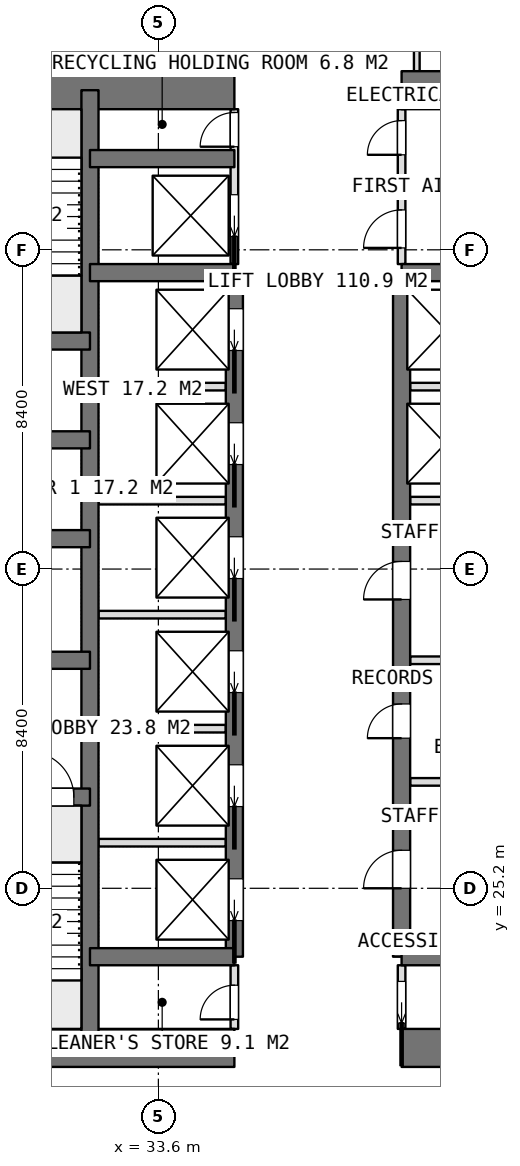
"""IFC4 building model, lengths in metres.
Left out: names, types, materials, properties, quantities, classifications, styles, units other than length and angle.
Written with IfcOpenShell. Run it as: python <this file> out.ifc"""

import sys

from ifc_helpers import new_model, si_unit, direction, frame, frame_2d, origin, place, context, subcontext, project, spatial, rectangle, extrude, element, fill, save


model = new_model("IFC4")
c1 = context("Model", 3, precision=1e-05, world=origin(), true_north=direction((0.0, 1.0)))
c2 = subcontext(c1, "Body", "Model", "MODEL_VIEW")
j1 = project(units=[si_unit("LENGTHUNIT", "METRE"), si_unit("PLANEANGLEUNIT", "RADIAN")], contexts=[c1])
p1 = place(None, origin())
s1 = spatial("IfcSite", under=j1, at=p1, CompositionType="ELEMENT")
p2 = place(p1, origin())
s2 = spatial("IfcBuilding", under=s1, at=p2, CompositionType="ELEMENT")
p3 = place(p2, frame((0.0, 0.0, 213.95)))
s3 = spatial("IfcBuildingStorey", under=s2, at=p3, CompositionType="ELEMENT", Elevation=213.95)
p4 = place(p3, frame((25.2, 21.0, 0.0), z_axis=(0.0, 0.0, 1.0), x_axis=(1.0, 0.0, 0.0)))
e1 = element("IfcWall", 1, at=p4, inside=s3, PredefinedType="SHEAR", context=c2, shape_type="SweptSolid", body=[
    extrude(rectangle(XDim=10.4, YDim=1.0, at=frame_2d((5.2, 0.0))), origin(), (0.0, 0.0, 1.0), 3.75),
])
p5 = place(p3, frame((40.0, 21.0, 0.0), z_axis=(0.0, 0.0, 1.0), x_axis=(1.0, 0.0, 0.0)))
e2 = element("IfcWall", 2, at=p5, inside=s3, PredefinedType="SHEAR", context=c2, shape_type="SweptSolid", body=[
    extrude(rectangle(XDim=10.4, YDim=1.0, at=frame_2d((5.2, 0.0))), origin(), (0.0, 0.0, 1.0), 3.75),
])
p6 = place(p3, frame((25.2, 46.2, 0.0), z_axis=(0.0, 0.0, 1.0), x_axis=(1.0, 0.0, 0.0)))
e3 = element("IfcWall", 3, at=p6, inside=s3, PredefinedType="SHEAR", context=c2, shape_type="SweptSolid", body=[
    extrude(rectangle(XDim=10.4, YDim=1.0, at=frame_2d((5.2, 0.0))), origin(), (0.0, 0.0, 1.0), 3.75),
])
p7 = place(p3, frame((40.0, 46.2, 0.0), z_axis=(0.0, 0.0, 1.0), x_axis=(1.0, 0.0, 0.0)))
e4 = element("IfcWall", 4, at=p7, inside=s3, PredefinedType="SHEAR", context=c2, shape_type="SweptSolid", body=[
    extrude(rectangle(XDim=10.4, YDim=1.0, at=frame_2d((5.2, 0.0))), origin(), (0.0, 0.0, 1.0), 3.75),
])
p8 = place(p3, frame((31.8, 21.0, 0.0), z_axis=(0.0, 0.0, 1.0), x_axis=(0.0, 1.0, 0.0)))
e5 = element("IfcWall", 5, at=p8, inside=s3, PredefinedType="SHEAR", context=c2, shape_type="SweptSolid", body=[
    extrude(rectangle(XDim=25.2, YDim=0.45, at=frame_2d((12.6, 0.0))), origin(), (0.0, 0.0, 1.0), 3.75),
])
p9 = place(p3, frame((35.6, 23.4, 0.0), z_axis=(0.0, 0.0, 1.0), x_axis=(0.0, 1.0, 0.0)))
e6 = element("IfcWall", 6, at=p9, inside=s3, PredefinedType="SHEAR", context=c2, shape_type="SweptSolid", body=[
    extrude(rectangle(XDim=18.0, YDim=0.45, at=frame_2d((9.0, 0.0))), origin(), (0.0, 0.0, 1.0), 3.75),
])
p10 = place(p9, frame((0.95, 0.0, 0.0)))
e7 = element("IfcOpeningElement", 7, at=p10, cuts=e6, PredefinedType="OPENING", context=c2, shape_type="SweptSolid", body=[
    extrude(rectangle(XDim=1.1, YDim=2.1, at=frame_2d((0.55, 1.05))), frame((0.0, 0.235, 0.0), z_axis=(0.0, -1.0, 0.0), x_axis=(1.0, 0.0, 0.0)), (0.0, 0.0, 1.0), 0.47),
])
p11 = place(p9, frame((3.95, 0.0, 0.0)))
e8 = element("IfcOpeningElement", 8, at=p11, cuts=e6, PredefinedType="OPENING", context=c2, shape_type="SweptSolid", body=[
    extrude(rectangle(XDim=1.1, YDim=2.1, at=frame_2d((0.55, 1.05))), frame((0.0, 0.235, 0.0), z_axis=(0.0, -1.0, 0.0), x_axis=(1.0, 0.0, 0.0)), (0.0, 0.0, 1.0), 0.47),
])
p12 = place(p9, frame((6.95, 0.0, 0.0)))
e9 = element("IfcOpeningElement", 9, at=p12, cuts=e6, PredefinedType="OPENING", context=c2, shape_type="SweptSolid", body=[
    extrude(rectangle(XDim=1.1, YDim=2.1, at=frame_2d((0.55, 1.05))), frame((0.0, 0.235, 0.0), z_axis=(0.0, -1.0, 0.0), x_axis=(1.0, 0.0, 0.0)), (0.0, 0.0, 1.0), 0.47),
])
p13 = place(p9, frame((9.95, 0.0, 0.0)))
e10 = element("IfcOpeningElement", 10, at=p13, cuts=e6, PredefinedType="OPENING", context=c2, shape_type="SweptSolid", body=[
    extrude(rectangle(XDim=1.1, YDim=2.1, at=frame_2d((0.55, 1.05))), frame((0.0, 0.235, 0.0), z_axis=(0.0, -1.0, 0.0), x_axis=(1.0, 0.0, 0.0)), (0.0, 0.0, 1.0), 0.47),
])
p14 = place(p9, frame((12.95, 0.0, 0.0)))
e11 = element("IfcOpeningElement", 11, at=p14, cuts=e6, PredefinedType="OPENING", context=c2, shape_type="SweptSolid", body=[
    extrude(rectangle(XDim=1.1, YDim=2.1, at=frame_2d((0.55, 1.05))), frame((0.0, 0.235, 0.0), z_axis=(0.0, -1.0, 0.0), x_axis=(1.0, 0.0, 0.0)), (0.0, 0.0, 1.0), 0.47),
])
p15 = place(p9, frame((15.95, 0.0, 0.0)))
e12 = element("IfcOpeningElement", 12, at=p15, cuts=e6, PredefinedType="OPENING", context=c2, shape_type="SweptSolid", body=[
    extrude(rectangle(XDim=1.1, YDim=2.1, at=frame_2d((0.55, 1.05))), frame((0.0, 0.235, 0.0), z_axis=(0.0, -1.0, 0.0), x_axis=(1.0, 0.0, 0.0)), (0.0, 0.0, 1.0), 0.47),
])
p16 = place(p3, frame((40.0, 23.4, 0.0), z_axis=(0.0, 0.0, 1.0), x_axis=(0.0, 1.0, 0.0)))
e13 = element("IfcWall", 13, at=p16, inside=s3, PredefinedType="SHEAR", context=c2, shape_type="SweptSolid", body=[
    extrude(rectangle(XDim=18.0, YDim=0.45, at=frame_2d((9.0, 0.0))), origin(), (0.0, 0.0, 1.0), 3.75),
])
p17 = place(p16, frame((1.8, 0.0, 0.0)))
e14 = element("IfcOpeningElement", 14, at=p17, cuts=e13, PredefinedType="OPENING", context=c2, shape_type="SweptSolid", body=[
    extrude(rectangle(XDim=1.0, YDim=2.1, at=frame_2d((0.5, 1.05))), frame((0.0, 0.235, 0.0), z_axis=(0.0, -1.0, 0.0), x_axis=(1.0, 0.0, 0.0)), (0.0, 0.0, 1.0), 0.47),
])
p18 = place(p16, frame((5.75, 0.0, 0.0)))
e15 = element("IfcOpeningElement", 15, at=p18, cuts=e13, PredefinedType="OPENING", context=c2, shape_type="SweptSolid", body=[
    extrude(rectangle(XDim=0.9, YDim=2.1, at=frame_2d((0.45, 1.05))), frame((0.0, 0.235, 0.0), z_axis=(0.0, -1.0, 0.0), x_axis=(1.0, 0.0, 0.0)), (0.0, 0.0, 1.0), 0.47),
])
p19 = place(p16, frame((9.4, 0.0, 0.0)))
e16 = element("IfcOpeningElement", 16, at=p19, cuts=e13, PredefinedType="OPENING", context=c2, shape_type="SweptSolid", body=[
    extrude(rectangle(XDim=1.0, YDim=2.1, at=frame_2d((0.5, 1.05))), frame((0.0, 0.235, 0.0), z_axis=(0.0, -1.0, 0.0), x_axis=(1.0, 0.0, 0.0)), (0.0, 0.0, 1.0), 0.47),
])
for number, where, z_axis, x_axis in (
    (17, (31.8, 23.4, 0.0), (0.0, 0.0, 1.0), (1.0, 0.0, 0.0)),
    (18, (31.8, 41.4, 0.0), (0.0, 0.0, 1.0), (1.0, 0.0, 0.0)),
    (19, (31.8, 44.4, 0.0), (0.0, 0.0, 1.0), (1.0, 0.0, 0.0)),
    (20, (40.0, 23.4, 0.0), (0.0, 0.0, 1.0), (1.0, 0.0, 0.0)),
    (21, (40.0, 41.4, 0.0), (0.0, 0.0, 1.0), (1.0, 0.0, 0.0)),
):
    element("IfcWall", number, at=place(p3, frame(where, z_axis=z_axis, x_axis=x_axis)), inside=s3, PredefinedType="SHEAR", context=c2, shape_type="SweptSolid", body=[
        extrude(rectangle(XDim=3.8, YDim=0.45, at=frame_2d((1.9, 0.0))), origin(), (0.0, 0.0, 1.0), 3.75),
    ])
p20 = place(p3, frame((25.2, 27.6, 0.0), z_axis=(0.0, 0.0, 1.0), x_axis=(1.0, 0.0, 0.0)))
e22 = element("IfcWall", 22, at=p20, inside=s3, PredefinedType="SHEAR", context=c2, shape_type="SweptSolid", body=[
    extrude(rectangle(XDim=6.6, YDim=0.45, at=frame_2d((3.3, 0.0))), origin(), (0.0, 0.0, 1.0), 3.75),
])
p21 = place(p20, frame((4.975, 0.0, 0.0)))
e23 = element("IfcOpeningElement", 23, at=p21, cuts=e22, PredefinedType="OPENING", context=c2, shape_type="SweptSolid", body=[
    extrude(rectangle(XDim=1.2, YDim=2.1, at=frame_2d((0.6, 1.05))), frame((0.0, 0.235, 0.0), z_axis=(0.0, -1.0, 0.0), x_axis=(1.0, 0.0, 0.0)), (0.0, 0.0, 1.0), 0.47),
])
p22 = place(p3, frame((25.2, 31.2, 0.0), z_axis=(0.0, 0.0, 1.0), x_axis=(1.0, 0.0, 0.0)))
e24 = element("IfcWall", 24, at=p22, inside=s3, PredefinedType="SHEAR", context=c2, shape_type="SweptSolid", body=[
    extrude(rectangle(XDim=6.6, YDim=0.45, at=frame_2d((3.3, 0.0))), origin(), (0.0, 0.0, 1.0), 3.75),
])
p23 = place(p22, frame((2.65, 0.0, 0.0)))
e25 = element("IfcOpeningElement", 25, at=p23, cuts=e24, PredefinedType="OPENING", context=c2, shape_type="SweptSolid", body=[
    extrude(rectangle(XDim=1.3, YDim=2.1, at=frame_2d((0.65, 1.05))), frame((0.0, 0.235, 0.0), z_axis=(0.0, -1.0, 0.0), x_axis=(1.0, 0.0, 0.0)), (0.0, 0.0, 1.0), 0.47),
])
for number, where, z_axis, x_axis in (
    (26, (25.2, 34.4, 0.0), (0.0, 0.0, 1.0), (1.0, 0.0, 0.0)),
    (27, (25.2, 37.0, 0.0), (0.0, 0.0, 1.0), (1.0, 0.0, 0.0)),
    (28, (25.2, 39.6, 0.0), (0.0, 0.0, 1.0), (1.0, 0.0, 0.0)),
):
    element("IfcWall", number, at=place(p3, frame(where, z_axis=z_axis, x_axis=x_axis)), inside=s3, PredefinedType="SHEAR", context=c2, shape_type="SweptSolid", body=[
        extrude(rectangle(XDim=6.6, YDim=0.45, at=frame_2d((3.3, 0.0))), origin(), (0.0, 0.0, 1.0), 3.75),
    ])
for number, where, z_axis, x_axis in (
    (29, (32.025, 26.4, 0.0), (0.0, 0.0, 1.0), (1.0, 0.0, 0.0)),
    (30, (32.025, 29.4, 0.0), (0.0, 0.0, 1.0), (1.0, 0.0, 0.0)),
    (31, (32.025, 32.4, 0.0), (0.0, 0.0, 1.0), (1.0, 0.0, 0.0)),
    (32, (32.025, 35.4, 0.0), (0.0, 0.0, 1.0), (1.0, 0.0, 0.0)),
    (33, (32.025, 38.4, 0.0), (0.0, 0.0, 1.0), (1.0, 0.0, 0.0)),
):
    element("IfcWall", number, at=place(p3, frame(where, z_axis=z_axis, x_axis=x_axis)), inside=s3, PredefinedType="PARTITIONING", context=c2, shape_type="SweptSolid", body=[
        extrude(rectangle(XDim=3.35, YDim=0.2, at=frame_2d((1.675, 0.0))), origin(), (0.0, 0.0, 1.0), 3.5),
    ])
for number, where, z_axis, x_axis in (
    (34, (40.225, 35.4, 0.0), (0.0, 0.0, 1.0), (1.0, 0.0, 0.0)),
    (35, (40.225, 38.4, 0.0), (0.0, 0.0, 1.0), (1.0, 0.0, 0.0)),
):
    element("IfcWall", number, at=place(p3, frame(where, z_axis=z_axis, x_axis=x_axis)), inside=s3, PredefinedType="PARTITIONING", context=c2, shape_type="SweptSolid", body=[
        extrude(rectangle(XDim=3.35, YDim=0.2, at=frame_2d((1.675, 0.0))), origin(), (0.0, 0.0, 1.0), 3.5),
    ])
p24 = place(p3, frame((40.0, 21.5, 0.0), z_axis=(0.0, 0.0, 1.0), x_axis=(0.0, 1.0, 0.0)))
e36 = element("IfcWall", 36, at=p24, inside=s3, PredefinedType="PARTITIONING", context=c2, shape_type="SweptSolid", body=[
    extrude(rectangle(XDim=1.675, YDim=0.2, at=frame_2d((0.837, 0.0))), origin(), (0.0, 0.0, 1.0), 3.5),
])
p25 = place(p24, frame((0.15, 0.0, 0.0)))
e37 = element("IfcOpeningElement", 37, at=p25, cuts=e36, PredefinedType="OPENING", context=c2, shape_type="SweptSolid", body=[
    extrude(rectangle(XDim=1.1, YDim=2.1, at=frame_2d((0.55, 1.05))), frame((0.0, 0.11, 0.0), z_axis=(0.0, -1.0, 0.0), x_axis=(1.0, 0.0, 0.0)), (0.0, 0.0, 1.0), 0.22),
])
p26 = place(p3, frame((40.0, 41.625, 0.0), z_axis=(0.0, 0.0, 1.0), x_axis=(0.0, 1.0, 0.0)))
e38 = element("IfcWall", 38, at=p26, inside=s3, PredefinedType="PARTITIONING", context=c2, shape_type="SweptSolid", body=[
    extrude(rectangle(XDim=4.075, YDim=0.2, at=frame_2d((2.038, 0.0))), origin(), (0.0, 0.0, 1.0), 3.5),
])
p27 = place(p26, frame((2.875, 0.0, 0.0)))
e39 = element("IfcOpeningElement", 39, at=p27, cuts=e38, PredefinedType="OPENING", context=c2, shape_type="SweptSolid", body=[
    extrude(rectangle(XDim=0.9, YDim=2.1, at=frame_2d((0.45, 1.05))), frame((0.0, 0.11, 0.0), z_axis=(0.0, -1.0, 0.0), x_axis=(1.0, 0.0, 0.0)), (0.0, 0.0, 1.0), 0.22),
])
p28 = place(p26, frame((0.425, 0.0, 0.0)))
e40 = element("IfcOpeningElement", 40, at=p28, cuts=e38, PredefinedType="OPENING", context=c2, shape_type="SweptSolid", body=[
    extrude(rectangle(XDim=1.0, YDim=2.1, at=frame_2d((0.5, 1.05))), frame((0.0, 0.11, 0.0), z_axis=(0.0, -1.0, 0.0), x_axis=(1.0, 0.0, 0.0)), (0.0, 0.0, 1.0), 0.22),
])
p29 = place(p3, frame((35.6, 41.625, 0.0), z_axis=(0.0, 0.0, 1.0), x_axis=(0.0, 1.0, 0.0)))
e41 = element("IfcWall", 41, at=p29, inside=s3, PredefinedType="PARTITIONING", context=c2, shape_type="SweptSolid", body=[
    extrude(rectangle(XDim=4.075, YDim=0.2, at=frame_2d((2.038, 0.0))), origin(), (0.0, 0.0, 1.0), 3.5),
])
p30 = place(p29, frame((3.088, 0.0, 0.0)))
e42 = element("IfcOpeningElement", 42, at=p30, cuts=e41, PredefinedType="OPENING", context=c2, shape_type="SweptSolid", body=[
    extrude(rectangle(XDim=0.9, YDim=2.1, at=frame_2d((0.45, 1.05))), frame((0.0, 0.11, 0.0), z_axis=(0.0, -1.0, 0.0), x_axis=(1.0, 0.0, 0.0)), (0.0, 0.0, 1.0), 0.22),
])
p31 = place(p29, frame((0.725, 0.0, 0.0)))
e43 = element("IfcOpeningElement", 43, at=p31, cuts=e41, PredefinedType="OPENING", context=c2, shape_type="SweptSolid", body=[
    extrude(rectangle(XDim=1.1, YDim=2.1, at=frame_2d((0.55, 1.05))), frame((0.0, 0.11, 0.0), z_axis=(0.0, -1.0, 0.0), x_axis=(1.0, 0.0, 0.0)), (0.0, 0.0, 1.0), 0.22),
])
p32 = place(p3, frame((35.6, 21.5, 0.0), z_axis=(0.0, 0.0, 1.0), x_axis=(0.0, 1.0, 0.0)))
e44 = element("IfcWall", 44, at=p32, inside=s3, PredefinedType="PARTITIONING", context=c2, shape_type="SweptSolid", body=[
    extrude(rectangle(XDim=1.675, YDim=0.2, at=frame_2d((0.837, 0.0))), origin(), (0.0, 0.0, 1.0), 3.5),
])
p33 = place(p32, frame((0.25, 0.0, 0.0)))
e45 = element("IfcOpeningElement", 45, at=p33, cuts=e44, PredefinedType="OPENING", context=c2, shape_type="SweptSolid", body=[
    extrude(rectangle(XDim=0.9, YDim=2.1, at=frame_2d((0.45, 1.05))), frame((0.0, 0.11, 0.0), z_axis=(0.0, -1.0, 0.0), x_axis=(1.0, 0.0, 0.0)), (0.0, 0.0, 1.0), 0.22),
])
for number, where, z_axis, x_axis in (
    (46, (40.225, 28.0, 0.0), (0.0, 0.0, 1.0), (1.0, 0.0, 0.0)),
    (47, (40.225, 31.2, 0.0), (0.0, 0.0, 1.0), (1.0, 0.0, 0.0)),
):
    element("IfcWall", number, at=place(p3, frame(where, z_axis=z_axis, x_axis=x_axis)), inside=s3, PredefinedType="PARTITIONING", context=c2, shape_type="SweptSolid", body=[
        extrude(rectangle(XDim=3.35, YDim=0.2, at=frame_2d((1.675, 0.0))), origin(), (0.0, 0.0, 1.0), 3.5),
    ])
p34 = place(p3, frame((40.0, 43.7, 0.0), z_axis=(0.0, 0.0, 1.0), x_axis=(1.0, 0.0, 0.0)))
e48 = element("IfcWall", 48, at=p34, inside=s3, PredefinedType="PARTITIONING", context=c2, shape_type="SweptSolid", body=[
    extrude(rectangle(XDim=3.575, YDim=0.2, at=frame_2d((1.788, 0.0))), origin(), (0.0, 0.0, 1.0), 3.5),
])
for number, where, z_axis, x_axis in (
    (49, (40.4, 46.7, 0.0), (0.0, 0.0, 1.0), (0.0, 1.0, 0.0)),
    (50, (35.2, 46.7, 0.0), (0.0, 0.0, 1.0), (0.0, 1.0, 0.0)),
):
    element("IfcWall", number, at=place(p3, frame(where, z_axis=z_axis, x_axis=x_axis)), inside=s3, PredefinedType="PARTITIONING", context=c2, shape_type="SweptSolid", body=[
        extrude(rectangle(XDim=2.625, YDim=0.15, at=frame_2d((1.312, 0.0))), origin(), (0.0, 0.0, 1.0), 3.5),
    ])
p35 = place(p25, origin())
e51 = element("IfcDoor", 51, at=p35, inside=s3, OperationType="SLIDING_TO_LEFT", PredefinedType="DOOR", context=c2, shape_type="SweptSolid", body=[
    extrude(rectangle(XDim=1.1, YDim=2.1, at=frame_2d((0.55, 1.05))), frame((0.0, 0.025, 0.0), z_axis=(0.0, -1.0, 0.0), x_axis=(1.0, 0.0, 0.0)), (0.0, 0.0, 1.0), 0.05),
])
fill(e37, e51)
p36 = place(p33, origin())
e52 = element("IfcDoor", 52, at=p36, inside=s3, OperationType="SINGLE_SWING_LEFT", PredefinedType="DOOR", context=c2, shape_type="SweptSolid", body=[
    extrude(rectangle(XDim=0.9, YDim=2.1, at=frame_2d((0.45, 1.05))), frame((0.0, 0.025, 0.0), z_axis=(0.0, -1.0, 0.0), x_axis=(1.0, 0.0, 0.0)), (0.0, 0.0, 1.0), 0.05),
])
fill(e45, e52)
p37 = place(p27, origin())
e53 = element("IfcDoor", 53, at=p37, inside=s3, OperationType="SINGLE_SWING_LEFT", PredefinedType="DOOR", context=c2, shape_type="SweptSolid", body=[
    extrude(rectangle(XDim=0.9, YDim=2.1, at=frame_2d((0.45, 1.05))), frame((0.0, 0.025, 0.0), z_axis=(0.0, -1.0, 0.0), x_axis=(1.0, 0.0, 0.0)), (0.0, 0.0, 1.0), 0.05),
])
fill(e39, e53)
p38 = place(p28, origin())
e54 = element("IfcDoor", 54, at=p38, inside=s3, OperationType="SINGLE_SWING_LEFT", PredefinedType="DOOR", context=c2, shape_type="SweptSolid", body=[
    extrude(rectangle(XDim=1.0, YDim=2.1, at=frame_2d((0.5, 1.05))), frame((0.0, 0.025, 0.0), z_axis=(0.0, -1.0, 0.0), x_axis=(1.0, 0.0, 0.0)), (0.0, 0.0, 1.0), 0.05),
])
fill(e40, e54)
p39 = place(p17, origin())
e55 = element("IfcDoor", 55, at=p39, inside=s3, OperationType="SINGLE_SWING_LEFT", PredefinedType="DOOR", context=c2, shape_type="SweptSolid", body=[
    extrude(rectangle(XDim=1.0, YDim=2.1, at=frame_2d((0.5, 1.05))), frame((0.0, 0.025, 0.0), z_axis=(0.0, -1.0, 0.0), x_axis=(1.0, 0.0, 0.0)), (0.0, 0.0, 1.0), 0.05),
])
fill(e14, e55)
p40 = place(p18, origin())
e56 = element("IfcDoor", 56, at=p40, inside=s3, OperationType="SINGLE_SWING_LEFT", PredefinedType="DOOR", context=c2, shape_type="SweptSolid", body=[
    extrude(rectangle(XDim=0.9, YDim=2.1, at=frame_2d((0.45, 1.05))), frame((0.0, 0.025, 0.0), z_axis=(0.0, -1.0, 0.0), x_axis=(1.0, 0.0, 0.0)), (0.0, 0.0, 1.0), 0.05),
])
fill(e15, e56)
p41 = place(p19, origin())
e57 = element("IfcDoor", 57, at=p41, inside=s3, OperationType="SINGLE_SWING_LEFT", PredefinedType="DOOR", context=c2, shape_type="SweptSolid", body=[
    extrude(rectangle(XDim=1.0, YDim=2.1, at=frame_2d((0.5, 1.05))), frame((0.0, 0.025, 0.0), z_axis=(0.0, -1.0, 0.0), x_axis=(1.0, 0.0, 0.0)), (0.0, 0.0, 1.0), 0.05),
])
fill(e16, e57)
p42 = place(p30, origin())
e58 = element("IfcDoor", 58, at=p42, inside=s3, OperationType="SINGLE_SWING_LEFT", PredefinedType="DOOR", context=c2, shape_type="SweptSolid", body=[
    extrude(rectangle(XDim=0.9, YDim=2.1, at=frame_2d((0.45, 1.05))), frame((0.0, 0.025, 0.0), z_axis=(0.0, -1.0, 0.0), x_axis=(1.0, 0.0, 0.0)), (0.0, 0.0, 1.0), 0.05),
])
fill(e42, e58)
p43 = place(p10, origin())
e59 = element("IfcDoor", 59, at=p43, inside=s3, OperationType="SLIDING_TO_LEFT", PredefinedType="USERDEFINED", context=c2, shape_type="SweptSolid", body=[
    extrude(rectangle(XDim=1.1, YDim=2.1, at=frame_2d((0.55, 1.05))), frame((0.0, 0.025, 0.0), z_axis=(0.0, -1.0, 0.0), x_axis=(1.0, 0.0, 0.0)), (0.0, 0.0, 1.0), 0.05),
])
fill(e7, e59)
p44 = place(p11, origin())
e60 = element("IfcDoor", 60, at=p44, inside=s3, OperationType="SLIDING_TO_LEFT", PredefinedType="USERDEFINED", context=c2, shape_type="SweptSolid", body=[
    extrude(rectangle(XDim=1.1, YDim=2.1, at=frame_2d((0.55, 1.05))), frame((0.0, 0.025, 0.0), z_axis=(0.0, -1.0, 0.0), x_axis=(1.0, 0.0, 0.0)), (0.0, 0.0, 1.0), 0.05),
])
fill(e8, e60)
p45 = place(p12, origin())
e61 = element("IfcDoor", 61, at=p45, inside=s3, OperationType="SLIDING_TO_LEFT", PredefinedType="USERDEFINED", context=c2, shape_type="SweptSolid", body=[
    extrude(rectangle(XDim=1.1, YDim=2.1, at=frame_2d((0.55, 1.05))), frame((0.0, 0.025, 0.0), z_axis=(0.0, -1.0, 0.0), x_axis=(1.0, 0.0, 0.0)), (0.0, 0.0, 1.0), 0.05),
])
fill(e9, e61)
p46 = place(p13, origin())
e62 = element("IfcDoor", 62, at=p46, inside=s3, OperationType="SLIDING_TO_LEFT", PredefinedType="USERDEFINED", context=c2, shape_type="SweptSolid", body=[
    extrude(rectangle(XDim=1.1, YDim=2.1, at=frame_2d((0.55, 1.05))), frame((0.0, 0.025, 0.0), z_axis=(0.0, -1.0, 0.0), x_axis=(1.0, 0.0, 0.0)), (0.0, 0.0, 1.0), 0.05),
])
fill(e10, e62)
p47 = place(p14, origin())
e63 = element("IfcDoor", 63, at=p47, inside=s3, OperationType="SLIDING_TO_LEFT", PredefinedType="USERDEFINED", context=c2, shape_type="SweptSolid", body=[
    extrude(rectangle(XDim=1.1, YDim=2.1, at=frame_2d((0.55, 1.05))), frame((0.0, 0.025, 0.0), z_axis=(0.0, -1.0, 0.0), x_axis=(1.0, 0.0, 0.0)), (0.0, 0.0, 1.0), 0.05),
])
fill(e11, e63)
p48 = place(p15, origin())
e64 = element("IfcDoor", 64, at=p48, inside=s3, OperationType="SLIDING_TO_LEFT", PredefinedType="USERDEFINED", context=c2, shape_type="SweptSolid", body=[
    extrude(rectangle(XDim=1.1, YDim=2.1, at=frame_2d((0.55, 1.05))), frame((0.0, 0.025, 0.0), z_axis=(0.0, -1.0, 0.0), x_axis=(1.0, 0.0, 0.0)), (0.0, 0.0, 1.0), 0.05),
])
fill(e12, e64)
p49 = place(p31, origin())
e65 = element("IfcDoor", 65, at=p49, inside=s3, OperationType="SLIDING_TO_LEFT", PredefinedType="USERDEFINED", context=c2, shape_type="SweptSolid", body=[
    extrude(rectangle(XDim=1.1, YDim=2.1, at=frame_2d((0.55, 1.05))), frame((0.0, 0.025, 0.0), z_axis=(0.0, -1.0, 0.0), x_axis=(1.0, 0.0, 0.0)), (0.0, 0.0, 1.0), 0.05),
])
fill(e43, e65)
p50 = place(p21, origin())
e66 = element("IfcDoor", 66, at=p50, inside=s3, OperationType="SINGLE_SWING_RIGHT", PredefinedType="DOOR", context=c2, shape_type="SweptSolid", body=[
    extrude(rectangle(XDim=1.2, YDim=2.1, at=frame_2d((0.6, 1.05))), frame((0.0, 0.025, 0.0), z_axis=(0.0, -1.0, 0.0), x_axis=(1.0, 0.0, 0.0)), (0.0, 0.0, 1.0), 0.05),
])
fill(e23, e66)
save(model, sys.argv[1])
